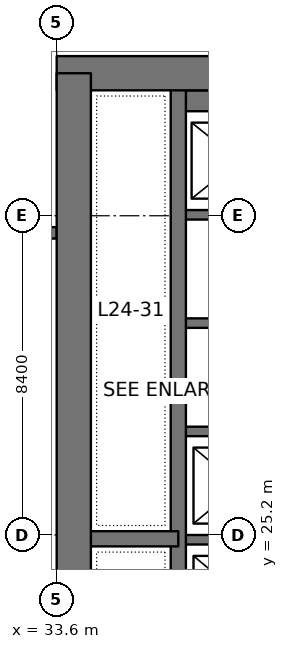
"""IFC4 building model, lengths in metres.
Left out: names, types, materials, properties, quantities, classifications, styles, units other than length and angle.
Written with IfcOpenShell. Run it as: python <this file> out.ifc"""

import sys

from ifc_helpers import new_model, si_unit, direction, frame, frame_2d, origin, place, context, subcontext, project, spatial, rectangle, extrude, element, save


model = new_model("IFC4")
c1 = context("Model", 3, precision=1e-05, world=origin(), true_north=direction((0.0, 1.0)))
c2 = subcontext(c1, "Body", "Model", "MODEL_VIEW")
j1 = project(units=[si_unit("LENGTHUNIT", "METRE"), si_unit("PLANEANGLEUNIT", "RADIAN")], contexts=[c1])
p1 = place(None, origin())
s1 = spatial("IfcSite", under=j1, at=p1, CompositionType="ELEMENT")
p2 = place(p1, origin())
s2 = spatial("IfcBuilding", under=s1, at=p2, CompositionType="ELEMENT")
p3 = place(p2, frame((0.0, 0.0, 109.2)))
s3 = spatial("IfcBuildingStorey", under=s2, at=p3, CompositionType="ELEMENT", Elevation=109.2)
p4 = place(p3, frame((33.6, 37.35, 0.0), z_axis=(0.0, 0.0, 1.0), x_axis=(1.0, 0.0, 0.0)))
e1 = element("IfcWall", 1, at=p4, inside=s3, PredefinedType="SHEAR", context=c2, shape_type="SweptSolid", body=[
    extrude(rectangle(XDim=18.0, YDim=0.9, at=frame_2d((9.0, 0.0))), origin(), (0.0, 0.0, 1.0), 4.2),
])
p5 = place(p4, frame((7.25, 0.0, 0.0)))
e2 = element("IfcOpeningElement", 2, at=p5, cuts=e1, PredefinedType="OPENING", context=c2, shape_type="SweptSolid", body=[
    extrude(rectangle(XDim=1.8, YDim=2.4, at=frame_2d((0.9, 1.2))), frame((0.0, 0.46, 0.0), z_axis=(0.0, -1.0, 0.0), x_axis=(1.0, 0.0, 0.0)), (0.0, 0.0, 1.0), 0.92),
])
p6 = place(p3, frame((34.05, 22.1, 0.0), z_axis=(0.0, 0.0, 1.0), x_axis=(0.0, 1.0, 0.0)))
e3 = element("IfcWall", 3, at=p6, inside=s3, PredefinedType="SHEAR", context=c2, shape_type="SweptSolid", body=[
    extrude(rectangle(XDim=15.25, YDim=0.9, at=frame_2d((7.625, 0.0))), origin(), (0.0, 0.0, 1.0), 4.2),
])
p7 = place(p3, frame((36.8, 22.225, 0.0), z_axis=(0.0, 0.0, 1.0), x_axis=(0.0, 1.0, 0.0)))
e4 = element("IfcWall", 4, at=p7, inside=s3, PredefinedType="SHEAR", context=c2, shape_type="SweptSolid", body=[
    extrude(rectangle(XDim=15.125, YDim=0.4, at=frame_2d((7.562, 0.0))), origin(), (0.0, 0.0, 1.0), 4.2),
])
p8 = place(p3, frame((36.8, 25.1, 0.0), z_axis=(0.0, 0.0, 1.0), x_axis=(-1.0, 0.0, 0.0)))
e5 = element("IfcWall", 5, at=p8, inside=s3, PredefinedType="SHEAR", context=c2, shape_type="SweptSolid", body=[
    extrude(rectangle(XDim=2.75, YDim=0.4, at=frame_2d((1.375, 0.0))), origin(), (0.0, 0.0, 1.0), 4.2),
])
for number, where, z_axis, x_axis in (
    (6, (40.0, 25.075, 0.0), (0.0, 0.0, 1.0), (-1.0, 0.0, 0.0)),
    (7, (40.0, 27.925, 0.0), (0.0, 0.0, 1.0), (-1.0, 0.0, 0.0)),
    (8, (40.0, 30.775, 0.0), (0.0, 0.0, 1.0), (-1.0, 0.0, 0.0)),
    (9, (40.0, 33.625, 0.0), (0.0, 0.0, 1.0), (-1.0, 0.0, 0.0)),
):
    element("IfcWall", number, at=place(p3, frame(where, z_axis=z_axis, x_axis=x_axis)), inside=s3, PredefinedType="SHEAR", context=c2, shape_type="SweptSolid", body=[
        extrude(rectangle(XDim=3.2, YDim=0.25, at=frame_2d((1.6, 0.0))), origin(), (0.0, 0.0, 1.0), 4.2),
    ])
p9 = place(p3, frame((40.0, 36.625, 0.0), z_axis=(0.0, 0.0, 1.0), x_axis=(-1.0, 0.0, 0.0)))
e10 = element("IfcWall", 10, at=p9, inside=s3, PredefinedType="SHEAR", context=c2, shape_type="SweptSolid", body=[
    extrude(rectangle(XDim=3.2, YDim=0.55, at=frame_2d((1.6, 0.0))), origin(), (0.0, 0.0, 1.0), 4.2),
])
p10 = place(p3, frame((26.025, 33.15, 0.0), z_axis=(0.0, 0.0, 1.0), x_axis=(1.0, 0.0, 0.0)))
e11 = element("IfcWall", 11, at=p10, inside=s3, PredefinedType="SOLIDWALL", context=c2, shape_type="SweptSolid", body=[
    extrude(rectangle(XDim=7.575, YDim=0.3, at=frame_2d((3.788, 0.0))), origin(), (0.0, 0.0, 1.0), 4.05),
])
p11 = place(p10, frame((0.587, 0.0, 0.1)))
e12 = element("IfcOpeningElement", 12, at=p11, cuts=e11, PredefinedType="OPENING", context=c2, shape_type="SweptSolid", body=[
    extrude(rectangle(XDim=2.0, YDim=3.0, at=frame_2d((1.0, 1.5))), frame((0.0, 0.16, 0.0), z_axis=(0.0, -1.0, 0.0), x_axis=(1.0, 0.0, 0.0)), (0.0, 0.0, 1.0), 0.32),
])
p12 = place(p10, frame((4.188, 0.0, 0.1)))
e13 = element("IfcOpeningElement", 13, at=p12, cuts=e11, PredefinedType="OPENING", context=c2, shape_type="SweptSolid", body=[
    extrude(rectangle(XDim=2.0, YDim=3.0, at=frame_2d((1.0, 1.5))), frame((0.0, 0.16, 0.0), z_axis=(0.0, -1.0, 0.0), x_axis=(1.0, 0.0, 0.0)), (0.0, 0.0, 1.0), 0.32),
])
save(model, sys.argv[1])
